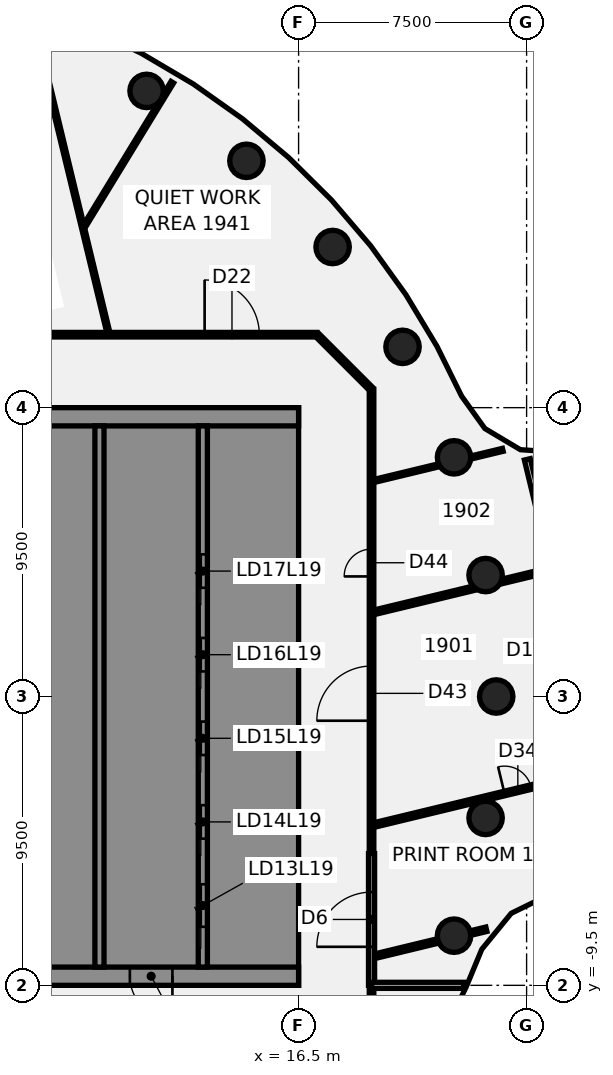
"""IFC4 building model, lengths in metres.
Left out: names, types, materials, properties, quantities, classifications, styles, units other than length and angle.
Written with IfcOpenShell. Run it as: python <this file> out.ifc"""

import sys

from ifc_helpers import new_model, si_unit, direction, frame, frame_2d, origin, origin_2d, place, context, subcontext, project, spatial, polyline, rectangle, circle, outline, extrude, element, fill, save


model = new_model("IFC4")
c1 = context("Model", 3, precision=1e-05, world=origin(), true_north=direction((0.0, 1.0)))
c2 = subcontext(c1, "Body", "Model", "MODEL_VIEW")
j1 = project(units=[si_unit("LENGTHUNIT", "METRE"), si_unit("PLANEANGLEUNIT", "RADIAN")], contexts=[c1])
p1 = place(None, origin())
s1 = spatial("IfcSite", under=j1, at=p1, CompositionType="ELEMENT")
p2 = place(p1, origin())
s2 = spatial("IfcBuilding", under=s1, at=p2, CompositionType="ELEMENT")
p3 = place(p2, frame((0.0, 0.0, 83.5)))
s3 = spatial("IfcBuildingStorey", under=s2, at=p3, CompositionType="ELEMENT", Elevation=83.5)
for number, where, z_axis, x_axis in (
    (1, (23.0, 0.0, -0.14), (0.0, 0.0, 1.0), (1.0, 0.0, 0.0)),
    (2, (22.651, 3.994, -0.14), (0.0, 0.0, 1.0), (1.0, 0.0, 0.0)),
    (3, (21.613, 7.866, -0.14), (0.0, 0.0, 1.0), (1.0, 0.0, 0.0)),
    (4, (19.919, 11.5, -0.14), (0.0, 0.0, 1.0), (1.0, 0.0, 0.0)),
    (5, (17.619, 14.784, -0.14), (0.0, 0.0, 1.0), (1.0, 0.0, 0.0)),
    (6, (14.784, 17.619, -0.14), (0.0, 0.0, 1.0), (1.0, 0.0, 0.0)),
    (7, (11.5, 19.919, -0.14), (0.0, 0.0, 1.0), (1.0, 0.0, 0.0)),
    (8, (7.866, 21.613, -0.14), (0.0, 0.0, 1.0), (1.0, 0.0, 0.0)),
    (9, (21.613, -7.866, -0.14), (0.0, 0.0, 1.0), (1.0, 0.0, 0.0)),
    (10, (22.651, -3.994, -0.14), (0.0, 0.0, 1.0), (1.0, 0.0, 0.0)),
):
    element("IfcColumn", number, at=place(p3, frame(where, z_axis=z_axis, x_axis=x_axis)), inside=s3, PredefinedType="COLUMN", context=c2, shape_type="SweptSolid", body=[
        extrude(circle(Radius=0.55, at=origin_2d()), origin(), (0.0, 0.0, 1.0), 3.75),
    ])
p4 = place(p3, frame((8.037, 21.098, 0.0), z_axis=(0.0, 0.0, 1.0), x_axis=(0.234859030848, -0.97202944175, 0.0)))
e11 = element("IfcWall", 11, at=p4, inside=s3, PredefinedType="PARTITIONING", context=c2, shape_type="SweptSolid", body=[
    extrude(rectangle(XDim=9.393, YDim=0.1, at=frame_2d((4.697, 0.0))), origin(), (0.0, 0.0, 1.0), 3.01),
])
p5 = place(p3, frame((24.024, 7.801, 0.0), z_axis=(0.0, 0.0, 1.0), x_axis=(0.234909613641, -0.972017218684, 0.0)))
e12 = element("IfcWall", 12, at=p5, inside=s3, PredefinedType="PARTITIONING", context=c2, shape_type="SweptSolid", body=[
    extrude(rectangle(XDim=13.806, YDim=0.2, at=frame_2d((6.903, 0.0))), origin(), (0.0, 0.0, 1.0), 3.01),
])
p6 = place(p5, frame((6.507, 0.0, 0.0)))
e13 = element("IfcOpeningElement", 13, at=p6, cuts=e12, PredefinedType="OPENING", context=c2, shape_type="SweptSolid", body=[
    extrude(rectangle(XDim=1.4, YDim=2.1, at=frame_2d((0.7, 1.05))), frame((0.0, 0.11, 0.0), z_axis=(0.0, -1.0, 0.0), x_axis=(1.0, 0.0, 0.0)), (0.0, 0.0, 1.0), 0.22),
])
p7 = place(p3, frame((17.128, 11.872, 0.0), z_axis=(0.0, 0.0, 1.0), x_axis=(0.707106781187, -0.707106781187, 0.0)))
e14 = element("IfcWall", 14, at=p7, inside=s3, PredefinedType="PARTITIONING", context=c2, shape_type="SweptSolid", body=[
    extrude(rectangle(XDim=2.465, YDim=0.15, at=frame_2d((1.232, 0.0))), origin(), (0.0, 0.0, 1.0), 3.01),
])
p8 = place(p3, frame((-17.065, 11.9, 0.0), z_axis=(0.0, 0.0, 1.0), x_axis=(1.0, 0.0, 0.0)))
e15 = element("IfcWall", 15, at=p8, inside=s3, PredefinedType="PARTITIONING", context=c2, shape_type="SweptSolid", body=[
    extrude(rectangle(XDim=34.165, YDim=0.15, at=frame_2d((17.083, 0.0))), origin(), (0.0, 0.0, 1.0), 3.01),
])
p9 = place(p8, frame((18.557, 0.0, 0.0)))
e16 = element("IfcOpeningElement", 16, at=p9, cuts=e15, PredefinedType="OPENING", context=c2, shape_type="SweptSolid", body=[
    extrude(rectangle(XDim=1.8, YDim=2.1, at=frame_2d((0.9, 1.05))), frame((0.0, 0.085, 0.0), z_axis=(0.0, -1.0, 0.0), x_axis=(1.0, 0.0, 0.0)), (0.0, 0.0, 1.0), 0.17),
])
p10 = place(p8, frame((30.474, 0.0, 0.0)))
e17 = element("IfcOpeningElement", 17, at=p10, cuts=e15, PredefinedType="OPENING", context=c2, shape_type="SweptSolid", body=[
    extrude(rectangle(XDim=1.8, YDim=2.1, at=frame_2d((0.9, 1.05))), frame((0.0, 0.085, 0.0), z_axis=(0.0, -1.0, 0.0), x_axis=(1.0, 0.0, 0.0)), (0.0, 0.0, 1.0), 0.17),
])
p11 = place(p8, frame((5.065, 0.0, 0.0)))
e18 = element("IfcOpeningElement", 18, at=p11, cuts=e15, PredefinedType="OPENING", context=c2, shape_type="SweptSolid", body=[
    extrude(rectangle(XDim=1.8, YDim=2.1, at=frame_2d((0.9, 1.05))), frame((0.0, 0.085, 0.0), z_axis=(0.0, -1.0, 0.0), x_axis=(1.0, 0.0, 0.0)), (0.0, 0.0, 1.0), 0.17),
])
p12 = place(p3, frame((18.973, -4.229, 0.0), z_axis=(0.0, 0.0, 1.0), x_axis=(0.97203792935, 0.234823899775, 0.0)))
e19 = element("IfcWall", 19, at=p12, inside=s3, PredefinedType="PARTITIONING", context=c2, shape_type="SweptSolid", body=[
    extrude(rectangle(XDim=7.635, YDim=0.15, at=frame_2d((3.818, 0.0))), origin(), (0.0, 0.0, 1.0), 3.01),
])
p13 = place(p12, frame((4.425, 0.0, 0.0)))
e20 = element("IfcOpeningElement", 20, at=p13, cuts=e19, PredefinedType="OPENING", context=c2, shape_type="SweptSolid", body=[
    extrude(rectangle(XDim=0.9, YDim=2.1, at=frame_2d((0.45, 1.05))), frame((0.0, 0.085, 0.0), z_axis=(0.0, -1.0, 0.0), x_axis=(1.0, 0.0, 0.0)), (0.0, 0.0, 1.0), 0.17),
])
p14 = place(p3, frame((18.973, 2.767, 0.0), z_axis=(0.0, 0.0, 1.0), x_axis=(0.972049735002, 0.234775025681, 0.0)))
e21 = element("IfcWall", 21, at=p14, inside=s3, PredefinedType="PARTITIONING", context=c2, shape_type="SweptSolid", body=[
    extrude(rectangle(XDim=3.431, YDim=0.15, at=frame_2d((1.715, 0.0))), origin(), (0.0, 0.0, 1.0), 3.01),
])
p15 = place(p3, frame((23.152, 3.776, 0.0), z_axis=(0.0, 0.0, 1.0), x_axis=(0.972053847495, 0.234757997882, 0.0)))
e22 = element("IfcWall", 22, at=p15, inside=s3, PredefinedType="PARTITIONING", context=c2, shape_type="SweptSolid", body=[
    extrude(rectangle(XDim=1.693, YDim=0.15, at=frame_2d((0.847, 0.0))), origin(), (0.0, 0.0, 1.0), 3.01),
])
p16 = place(p3, frame((18.968, 7.086, 0.0), z_axis=(0.0, 0.0, 1.0), x_axis=(0.972061412661, 0.234726670865, 0.0)))
e23 = element("IfcWall", 23, at=p16, inside=s3, PredefinedType="PARTITIONING", context=c2, shape_type="SweptSolid", body=[
    extrude(rectangle(XDim=2.217, YDim=0.1, at=frame_2d((1.108, 0.0))), origin(), (0.0, 0.0, 1.0), 3.01),
])
p17 = place(p3, frame((22.171, 7.86, 0.0), z_axis=(0.0, 0.0, 1.0), x_axis=(0.972021486392, 0.234891953868, 0.0)))
e24 = element("IfcWall", 24, at=p17, inside=s3, PredefinedType="PARTITIONING", context=c2, shape_type="SweptSolid", body=[
    extrude(rectangle(XDim=1.076, YDim=0.1, at=frame_2d((0.538, 0.0))), origin(), (0.0, 0.0, 1.0), 3.01),
])
p18 = place(p3, frame((18.9, -8.568, 0.0), z_axis=(0.0, 0.0, 1.0), x_axis=(0.971998948833, 0.234985198402, 0.0)))
e25 = element("IfcWall", 25, at=p18, inside=s3, PredefinedType="PARTITIONING", context=c2, shape_type="SweptSolid", body=[
    extrude(rectangle(XDim=2.262, YDim=0.15, at=frame_2d((1.131, 0.0))), origin(), (0.0, 0.0, 1.0), 3.01),
])
p19 = place(p3, frame((22.15, -7.782, 0.0), z_axis=(0.0, 0.0, 1.0), x_axis=(0.972046753294, 0.234787370638, 0.0)))
e26 = element("IfcWall", 26, at=p19, inside=s3, PredefinedType="PARTITIONING", context=c2, shape_type="SweptSolid", body=[
    extrude(rectangle(XDim=0.542, YDim=0.15, at=frame_2d((0.271, 0.0))), origin(), (0.0, 0.0, 1.0), 3.01),
])
p20 = place(p3, frame((9.464, 15.487, 0.0), z_axis=(0.0, 0.0, 1.0), x_axis=(0.521364250571, 0.85333423594, 0.0)))
e27 = element("IfcWall", 27, at=p20, inside=s3, PredefinedType="PARTITIONING", context=c2, shape_type="SweptSolid", body=[
    extrude(rectangle(XDim=5.528, YDim=0.1, at=frame_2d((2.764, 0.0))), origin(), (0.0, 0.0, 1.0), 3.01),
])
p21 = place(p3, frame((18.9, -10.1, 0.0), z_axis=(0.0, 0.0, 1.0), x_axis=(0.0, 1.0, 0.0)))
e28 = element("IfcWall", 28, at=p21, inside=s3, PredefinedType="PARTITIONING", context=c2, shape_type="SweptSolid", body=[
    extrude(rectangle(XDim=0.5, YDim=0.15, at=frame_2d((0.25, 0.0))), origin(), (0.0, 0.0, 1.0), 3.01),
])
p22 = place(p3, frame((18.9, -5.066, 0.0), z_axis=(0.0, 0.0, 1.0), x_axis=(0.0, 1.0, 0.0)))
e29 = element("IfcWall", 29, at=p22, inside=s3, PredefinedType="PARTITIONING", context=c2, shape_type="SweptSolid", body=[
    extrude(rectangle(XDim=15.166, YDim=0.15, at=frame_2d((7.583, 0.0))), origin(), (0.0, 0.0, 1.0), 3.01),
])
p23 = place(p22, frame((4.269, 0.0, 0.0)))
e30 = element("IfcOpeningElement", 30, at=p23, cuts=e29, PredefinedType="OPENING", context=c2, shape_type="SweptSolid", body=[
    extrude(rectangle(XDim=1.8, YDim=2.1, at=frame_2d((0.9, 1.05))), frame((0.0, 0.085, 0.0), z_axis=(0.0, -1.0, 0.0), x_axis=(1.0, 0.0, 0.0)), (0.0, 0.0, 1.0), 0.17),
])
p24 = place(p22, frame((9.015, 0.0, 0.0)))
e31 = element("IfcOpeningElement", 31, at=p24, cuts=e29, PredefinedType="OPENING", context=c2, shape_type="SweptSolid", body=[
    extrude(rectangle(XDim=0.9, YDim=2.1, at=frame_2d((0.45, 1.05))), frame((0.0, 0.085, 0.0), z_axis=(0.0, -1.0, 0.0), x_axis=(1.0, 0.0, 0.0)), (0.0, 0.0, 1.0), 0.17),
])
p25 = place(p3, frame((18.9, -9.5, 0.0), z_axis=(0.0, 0.0, 1.0), x_axis=(0.0, 1.0, 0.0)))
e32 = element("IfcWall", 32, at=p25, inside=s3, PredefinedType="SOLIDWALL", context=c2, shape_type="SweptSolid", body=[
    extrude(rectangle(XDim=4.334, YDim=0.2, at=frame_2d((2.167, 0.0))), origin(), (0.0, 0.0, 1.0), 3.014),
])
p26 = place(p25, frame((1.267, 0.0, 0.0)))
e33 = element("IfcOpeningElement", 33, at=p26, cuts=e32, PredefinedType="OPENING", context=c2, shape_type="SweptSolid", body=[
    extrude(rectangle(XDim=1.8, YDim=2.4, at=frame_2d((0.9, 1.2))), frame((0.0, 0.11, 0.0), z_axis=(0.0, -1.0, 0.0), x_axis=(1.0, 0.0, 0.0)), (0.0, 0.0, 1.0), 0.22),
])
p27 = place(p3, frame((18.9, -9.5, 0.0), z_axis=(0.0, 0.0, 1.0), x_axis=(1.0, 0.0, 0.0)))
e34 = element("IfcWall", 34, at=p27, inside=s3, PredefinedType="SOLIDWALL", context=c2, shape_type="SweptSolid", body=[
    extrude(rectangle(XDim=3.035, YDim=0.2, at=frame_2d((1.517, 0.0))), origin(), (0.0, 0.0, 1.0), 3.61),
])
p28 = place(p3, frame((16.5, -9.2, 0.0), z_axis=(0.0, 0.0, 1.0), x_axis=(-1.0, 0.0, 0.0)))
e35 = element("IfcWall", 35, at=p28, inside=s3, PredefinedType="SHEAR", context=c2, shape_type="SweptSolid", body=[
    extrude(rectangle(XDim=13.0, YDim=0.6, at=frame_2d((6.5, 0.0))), origin(), (0.0, 0.0, 1.0), 3.61),
])
p29 = place(p28, frame((4.15, 0.0, 0.0)))
e36 = element("IfcOpeningElement", 36, at=p29, cuts=e35, PredefinedType="OPENING", context=c2, shape_type="SweptSolid", body=[
    extrude(rectangle(XDim=1.4, YDim=2.1, at=frame_2d((0.7, 1.05))), frame((0.0, 0.31, 0.0), z_axis=(0.0, -1.0, 0.0), x_axis=(1.0, 0.0, 0.0)), (0.0, 0.0, 1.0), 0.62),
])
p30 = place(p28, frame((10.125, 0.0, 0.0)))
e37 = element("IfcOpeningElement", 37, at=p30, cuts=e35, PredefinedType="OPENING", context=c2, shape_type="SweptSolid", body=[
    extrude(rectangle(XDim=1.4, YDim=2.1, at=frame_2d((0.7, 1.05))), frame((0.0, 0.31, 0.0), z_axis=(0.0, -1.0, 0.0), x_axis=(1.0, 0.0, 0.0)), (0.0, 0.0, 1.0), 0.62),
])
p31 = place(p3, origin())
e38 = element("IfcWall", 38, at=p31, inside=s3, PredefinedType="SHEAR", context=c2, shape_type="SweptSolid", body=[
    extrude(outline(polyline([(13.5, -8.9), (15.9, -8.9), (16.5, -8.9), (16.5, 8.9), (15.9, 8.9), (13.5, 8.9), (13.5, 8.125), (15.9, 8.125), (15.9, 5.625), (13.5, 5.625), (13.5, 5.375), (15.9, 5.375), (15.9, 2.875), (13.5, 2.875), (13.5, 2.625), (15.9, 2.625), (15.9, 0.125), (13.5, 0.125), (13.5, -0.125), (15.9, -0.125), (15.9, -2.625), (13.5, -2.625), (13.5, -2.875), (15.9, -2.875), (15.9, -5.375), (13.5, -5.375), (13.5, -5.625), (15.9, -5.625), (15.9, -8.125), (13.5, -8.125), (13.5, -8.9)])), origin(), (0.0, 0.0, 1.0), 3.61),
])
p32 = place(p3, frame((16.5, 9.2, 0.0), z_axis=(0.0, 0.0, 1.0), x_axis=(-1.0, 0.0, 0.0)))
e39 = element("IfcWall", 39, at=p32, inside=s3, PredefinedType="SHEAR", context=c2, shape_type="SweptSolid", body=[
    extrude(rectangle(XDim=13.0, YDim=0.6, at=frame_2d((6.5, 0.0))), origin(), (0.0, 0.0, 1.0), 3.61),
])
p33 = place(p3, origin())
e40 = element("IfcWall", 40, at=p33, inside=s3, PredefinedType="SHEAR", context=c2, shape_type="SweptSolid", body=[
    extrude(outline(polyline([(9.8, -5.375), (7.5, -5.375), (7.5, -2.875), (9.8, -2.875), (9.8, -2.625), (7.5, -2.625), (7.5, -0.125), (9.8, -0.125), (9.8, 0.125), (7.5, 0.125), (7.5, 2.625), (9.8, 2.625), (9.8, 2.875), (7.5, 2.875), (7.5, 5.375), (9.8, 5.375), (9.8, 5.625), (7.5, 5.625), (7.5, 8.125), (9.8, 8.125), (9.8, 8.9), (7.5, 8.9), (7.2, 8.9), (7.2, -5.625), (7.5, -5.625), (9.8, -5.625), (9.8, -5.375)])), origin(), (0.0, 0.0, 1.0), 3.61),
])
p34 = place(p3, origin())
e41 = element("IfcWall", 41, at=p34, inside=s3, PredefinedType="SHEAR", context=c2, shape_type="SweptSolid", body=[
    extrude(outline(polyline([(7.5, -8.125), (7.5, -8.9), (9.8, -8.9), (9.8, -8.125), (9.8, -5.625), (9.55, -5.625), (9.55, -8.125), (7.5, -8.125)])), origin(), (0.0, 0.0, 1.0), 3.61),
])
p35 = place(p3, frame((13.35, -8.9, 0.0), z_axis=(0.0, 0.0, 1.0), x_axis=(0.0, 1.0, 0.0)))
e42 = element("IfcWall", 42, at=p35, inside=s3, PredefinedType="SHEAR", context=c2, shape_type="SweptSolid", body=[
    extrude(rectangle(XDim=17.8, YDim=0.3, at=frame_2d((8.9, 0.0))), origin(), (0.0, 0.0, 1.0), 3.61),
])
p36 = place(p35, frame((1.325, 0.0, 0.0)))
e43 = element("IfcOpeningElement", 43, at=p36, cuts=e42, PredefinedType="OPENING", context=c2, shape_type="SweptSolid", body=[
    extrude(rectangle(XDim=1.4, YDim=2.1, at=frame_2d((0.7, 1.05))), frame((0.0, 0.16, 0.0), z_axis=(0.0, -1.0, 0.0), x_axis=(1.0, 0.0, 0.0)), (0.0, 0.0, 1.0), 0.32),
])
p37 = place(p35, frame((4.225, 0.0, 0.0)))
e44 = element("IfcOpeningElement", 44, at=p37, cuts=e42, PredefinedType="OPENING", context=c2, shape_type="SweptSolid", body=[
    extrude(rectangle(XDim=1.1, YDim=2.1, at=frame_2d((0.55, 1.05))), frame((0.0, 0.16, 0.0), z_axis=(0.0, -1.0, 0.0), x_axis=(1.0, 0.0, 0.0)), (0.0, 0.0, 1.0), 0.32),
])
p38 = place(p35, frame((6.975, 0.0, 0.0)))
e45 = element("IfcOpeningElement", 45, at=p38, cuts=e42, PredefinedType="OPENING", context=c2, shape_type="SweptSolid", body=[
    extrude(rectangle(XDim=1.1, YDim=2.1, at=frame_2d((0.55, 1.05))), frame((0.0, 0.16, 0.0), z_axis=(0.0, -1.0, 0.0), x_axis=(1.0, 0.0, 0.0)), (0.0, 0.0, 1.0), 0.32),
])
p39 = place(p35, frame((9.725, 0.0, 0.0)))
e46 = element("IfcOpeningElement", 46, at=p39, cuts=e42, PredefinedType="OPENING", context=c2, shape_type="SweptSolid", body=[
    extrude(rectangle(XDim=1.1, YDim=2.1, at=frame_2d((0.55, 1.05))), frame((0.0, 0.16, 0.0), z_axis=(0.0, -1.0, 0.0), x_axis=(1.0, 0.0, 0.0)), (0.0, 0.0, 1.0), 0.32),
])
p40 = place(p35, frame((12.475, 0.0, 0.0)))
e47 = element("IfcOpeningElement", 47, at=p40, cuts=e42, PredefinedType="OPENING", context=c2, shape_type="SweptSolid", body=[
    extrude(rectangle(XDim=1.1, YDim=2.1, at=frame_2d((0.55, 1.05))), frame((0.0, 0.16, 0.0), z_axis=(0.0, -1.0, 0.0), x_axis=(1.0, 0.0, 0.0)), (0.0, 0.0, 1.0), 0.32),
])
p41 = place(p3, frame((9.95, -8.9, 0.0), z_axis=(0.0, 0.0, 1.0), x_axis=(0.0, 1.0, 0.0)))
e48 = element("IfcWall", 48, at=p41, inside=s3, PredefinedType="SHEAR", context=c2, shape_type="SweptSolid", body=[
    extrude(rectangle(XDim=17.8, YDim=0.3, at=frame_2d((8.9, 0.0))), origin(), (0.0, 0.0, 1.0), 3.61),
])
p42 = place(p10, origin())
e49 = element("IfcDoor", 49, at=p42, inside=s3, OperationType="DOUBLE_DOOR_SINGLE_SWING", PredefinedType="DOOR", context=c2, shape_type="SweptSolid", body=[
    extrude(rectangle(XDim=1.8, YDim=2.1, at=frame_2d((0.9, 1.05))), frame((0.0, 0.025, 0.0), z_axis=(0.0, -1.0, 0.0), x_axis=(1.0, 0.0, 0.0)), (0.0, 0.0, 1.0), 0.05),
])
fill(e17, e49)
p43 = place(p13, frame((0.9, 0.0, 0.0), z_axis=(0.0, 0.0, 1.0), x_axis=(-1.0, 0.0, 0.0)))
e50 = element("IfcDoor", 50, at=p43, inside=s3, OperationType="SINGLE_SWING_RIGHT", PredefinedType="DOOR", context=c2, shape_type="SweptSolid", body=[
    extrude(rectangle(XDim=0.9, YDim=2.1, at=frame_2d((0.45, 1.05))), frame((0.0, 0.025, 0.0), z_axis=(0.0, -1.0, 0.0), x_axis=(1.0, 0.0, 0.0)), (0.0, 0.0, 1.0), 0.05),
])
fill(e20, e50)
p44 = place(p23, origin())
e51 = element("IfcDoor", 51, at=p44, inside=s3, OperationType="DOUBLE_DOOR_SINGLE_SWING", PredefinedType="DOOR", context=c2, shape_type="SweptSolid", body=[
    extrude(rectangle(XDim=1.8, YDim=2.1, at=frame_2d((0.9, 1.05))), frame((0.0, 0.025, 0.0), z_axis=(0.0, -1.0, 0.0), x_axis=(1.0, 0.0, 0.0)), (0.0, 0.0, 1.0), 0.05),
])
fill(e30, e51)
p45 = place(p24, frame((0.9, 0.0, 0.0), z_axis=(0.0, 0.0, 1.0), x_axis=(-1.0, 0.0, 0.0)))
e52 = element("IfcDoor", 52, at=p45, inside=s3, OperationType="SINGLE_SWING_RIGHT", PredefinedType="DOOR", context=c2, shape_type="SweptSolid", body=[
    extrude(rectangle(XDim=0.9, YDim=2.1, at=frame_2d((0.45, 1.05))), frame((0.0, 0.025, 0.0), z_axis=(0.0, -1.0, 0.0), x_axis=(1.0, 0.0, 0.0)), (0.0, 0.0, 1.0), 0.05),
])
fill(e31, e52)
p46 = place(p26, origin())
e53 = element("IfcDoor", 53, at=p46, inside=s3, OperationType="SINGLE_SWING_LEFT", PredefinedType="DOOR", context=c2, shape_type="SweptSolid", body=[
    extrude(rectangle(XDim=1.8, YDim=2.4, at=frame_2d((0.9, 1.2))), frame((0.0, 0.025, 0.0), z_axis=(0.0, -1.0, 0.0), x_axis=(1.0, 0.0, 0.0)), (0.0, 0.0, 1.0), 0.05),
])
fill(e33, e53)
p47 = place(p29, origin())
e54 = element("IfcDoor", 54, at=p47, inside=s3, OperationType="SINGLE_SWING_LEFT", PredefinedType="DOOR", context=c2, shape_type="SweptSolid", body=[
    extrude(rectangle(XDim=1.4, YDim=2.1, at=frame_2d((0.7, 1.05))), frame((0.0, 0.025, 0.0), z_axis=(0.0, -1.0, 0.0), x_axis=(1.0, 0.0, 0.0)), (0.0, 0.0, 1.0), 0.05),
])
fill(e36, e54)
p48 = place(p36, origin())
e55 = element("IfcDoor", 55, at=p48, inside=s3, OperationType="SLIDING_TO_LEFT", PredefinedType="DOOR", context=c2, shape_type="SweptSolid", body=[
    extrude(rectangle(XDim=1.4, YDim=2.1, at=frame_2d((0.7, 1.05))), frame((0.0, 0.025, 0.0), z_axis=(0.0, -1.0, 0.0), x_axis=(1.0, 0.0, 0.0)), (0.0, 0.0, 1.0), 0.05),
])
fill(e43, e55)
p49 = place(p37, origin())
e56 = element("IfcDoor", 56, at=p49, inside=s3, OperationType="SLIDING_TO_LEFT", PredefinedType="DOOR", context=c2, shape_type="SweptSolid", body=[
    extrude(rectangle(XDim=1.1, YDim=2.1, at=frame_2d((0.55, 1.05))), frame((0.0, 0.025, 0.0), z_axis=(0.0, -1.0, 0.0), x_axis=(1.0, 0.0, 0.0)), (0.0, 0.0, 1.0), 0.05),
])
fill(e44, e56)
p50 = place(p38, origin())
e57 = element("IfcDoor", 57, at=p50, inside=s3, OperationType="SLIDING_TO_LEFT", PredefinedType="DOOR", context=c2, shape_type="SweptSolid", body=[
    extrude(rectangle(XDim=1.1, YDim=2.1, at=frame_2d((0.55, 1.05))), frame((0.0, 0.025, 0.0), z_axis=(0.0, -1.0, 0.0), x_axis=(1.0, 0.0, 0.0)), (0.0, 0.0, 1.0), 0.05),
])
fill(e45, e57)
p51 = place(p39, origin())
e58 = element("IfcDoor", 58, at=p51, inside=s3, OperationType="SLIDING_TO_LEFT", PredefinedType="DOOR", context=c2, shape_type="SweptSolid", body=[
    extrude(rectangle(XDim=1.1, YDim=2.1, at=frame_2d((0.55, 1.05))), frame((0.0, 0.025, 0.0), z_axis=(0.0, -1.0, 0.0), x_axis=(1.0, 0.0, 0.0)), (0.0, 0.0, 1.0), 0.05),
])
fill(e46, e58)
p52 = place(p40, origin())
e59 = element("IfcDoor", 59, at=p52, inside=s3, OperationType="SLIDING_TO_LEFT", PredefinedType="DOOR", context=c2, shape_type="SweptSolid", body=[
    extrude(rectangle(XDim=1.1, YDim=2.1, at=frame_2d((0.55, 1.05))), frame((0.0, 0.025, 0.0), z_axis=(0.0, -1.0, 0.0), x_axis=(1.0, 0.0, 0.0)), (0.0, 0.0, 1.0), 0.05),
])
fill(e47, e59)
save(model, sys.argv[1])
